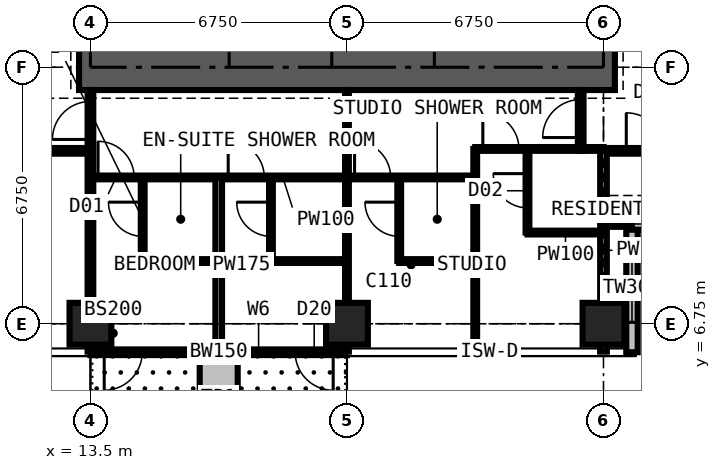
"""IFC4 building model, lengths in metres.
Left out: names, types, materials, properties, quantities, classifications, styles, units other than length and angle.
Written with IfcOpenShell. Run it as: python <this file> out.ifc"""

import sys

from ifc_helpers import new_model, si_unit, direction, frame, frame_2d, origin, origin_2d, place, context, subcontext, project, spatial, rectangle, extrude, element, fill, save


model = new_model("IFC4")
c1 = context("Model", 3, precision=1e-05, world=origin(), true_north=direction((0.0, 1.0)))
c2 = subcontext(c1, "Body", "Model", "MODEL_VIEW")
j1 = project(units=[si_unit("LENGTHUNIT", "METRE"), si_unit("PLANEANGLEUNIT", "RADIAN")], contexts=[c1])
p1 = place(None, origin())
s1 = spatial("IfcSite", under=j1, at=p1, CompositionType="ELEMENT")
p2 = place(p1, origin())
s2 = spatial("IfcBuilding", under=s1, at=p2, CompositionType="ELEMENT")
p3 = place(p2, frame((0.0, 0.0, 225.9)))
s3 = spatial("IfcBuildingStorey", under=s2, at=p3, CompositionType="ELEMENT", Elevation=225.9)
for number, where, z_axis, x_axis in (
    (1, (13.5, 6.75, 0.0), (0.0, 0.0, 1.0), (1.0, 0.0, 0.0)),
    (2, (20.25, 6.75, 0.0), (0.0, 0.0, 1.0), (1.0, 0.0, 0.0)),
    (3, (27.0, 6.75, 0.0), (0.0, 0.0, 1.0), (1.0, 0.0, 0.0)),
):
    element("IfcColumn", number, at=place(p3, frame(where, z_axis=z_axis, x_axis=x_axis)), inside=s3, PredefinedType="COLUMN", context=c2, shape_type="SweptSolid", body=[
        extrude(rectangle(XDim=1.1, YDim=1.1, at=origin_2d()), origin(), (0.0, 0.0, 1.0), 3.6),
    ])
p4 = place(p3, frame((13.2, 13.5, 0.0), z_axis=(0.0, 0.0, 1.0), x_axis=(1.0, 0.0, 0.0)))
e4 = element("IfcWall", 4, at=p4, inside=s3, PredefinedType="SHEAR", context=c2, shape_type="SweptSolid", body=[
    extrude(rectangle(XDim=14.1, YDim=1.2, at=frame_2d((7.05, 0.0))), origin(), (0.0, 0.0, 1.0), 3.6),
])
p5 = place(p3, frame((20.25, 6.0, 0.0), z_axis=(0.0, 0.0, 1.0), x_axis=(-1.0, 0.0, 0.0)))
e5 = element("IfcWall", 5, at=p5, inside=s3, PredefinedType="SOLIDWALL", context=c2, shape_type="SweptSolid", body=[
    extrude(rectangle(XDim=6.75, YDim=0.15, at=frame_2d((3.375, 0.0))), origin(), (0.0, 0.0, 1.0), 3.375),
])
p6 = place(p5, frame((0.363, 0.0, 0.0)))
e6 = element("IfcOpeningElement", 6, at=p6, cuts=e5, PredefinedType="OPENING", context=c2, shape_type="SweptSolid", body=[
    extrude(rectangle(XDim=1.0, YDim=2.2, at=frame_2d((0.5, 1.1))), frame((0.0, 0.085, 0.0), z_axis=(0.0, -1.0, 0.0), x_axis=(1.0, 0.0, 0.0)), (0.0, 0.0, 1.0), 0.17),
])
p7 = place(p5, frame((1.725, 0.0, 0.9)))
e7 = element("IfcOpeningElement", 7, at=p7, cuts=e5, PredefinedType="OPENING", context=c2, shape_type="SweptSolid", body=[
    extrude(rectangle(XDim=1.2, YDim=1.8, at=frame_2d((0.6, 0.9))), frame((0.0, 0.085, 0.0), z_axis=(0.0, -1.0, 0.0), x_axis=(1.0, 0.0, 0.0)), (0.0, 0.0, 1.0), 0.17),
])
p8 = place(p5, frame((5.387, 0.0, 0.0)))
e8 = element("IfcOpeningElement", 8, at=p8, cuts=e5, PredefinedType="OPENING", context=c2, shape_type="SweptSolid", body=[
    extrude(rectangle(XDim=1.0, YDim=2.2, at=frame_2d((0.5, 1.1))), frame((0.0, 0.085, 0.0), z_axis=(0.0, -1.0, 0.0), x_axis=(1.0, 0.0, 0.0)), (0.0, 0.0, 1.0), 0.17),
])
p9 = place(p5, frame((3.825, 0.0, 0.9)))
e9 = element("IfcOpeningElement", 9, at=p9, cuts=e5, PredefinedType="OPENING", context=c2, shape_type="SweptSolid", body=[
    extrude(rectangle(XDim=1.2, YDim=1.8, at=frame_2d((0.6, 0.9))), frame((0.0, 0.085, 0.0), z_axis=(0.0, -1.0, 0.0), x_axis=(1.0, 0.0, 0.0)), (0.0, 0.0, 1.0), 0.17),
])
p10 = place(p3, frame((27.75, 6.0, 0.0), z_axis=(0.0, 0.0, 1.0), x_axis=(0.0, 1.0, 0.0)))
e10 = element("IfcWall", 10, at=p10, inside=s3, PredefinedType="SOLIDWALL", context=c2, shape_type="SweptSolid", body=[
    extrude(rectangle(XDim=3.375, YDim=0.3, at=frame_2d((1.688, 0.0))), origin(), (0.0, 0.0, 1.0), 3.375),
])
p11 = place(p10, frame((0.788, 0.0, 0.6)))
e11 = element("IfcOpeningElement", 11, at=p11, cuts=e10, PredefinedType="OPENING", context=c2, shape_type="SweptSolid", body=[
    extrude(rectangle(XDim=1.8, YDim=2.1, at=frame_2d((0.9, 1.05))), frame((0.0, 0.16, 0.0), z_axis=(0.0, -1.0, 0.0), x_axis=(1.0, 0.0, 0.0)), (0.0, 0.0, 1.0), 0.32),
])
p12 = place(p3, frame((27.75, 9.375, 0.0), z_axis=(0.0, 0.0, 1.0), x_axis=(1.0, 0.0, 0.0)))
e12 = element("IfcWall", 12, at=p12, inside=s3, PredefinedType="SOLIDWALL", context=c2, shape_type="SweptSolid", body=[
    extrude(rectangle(XDim=3.375, YDim=0.3, at=frame_2d((1.688, 0.0))), origin(), (0.0, 0.0, 1.0), 3.375),
])
p13 = place(p12, frame((0.788, 0.0, 0.6)))
e13 = element("IfcOpeningElement", 13, at=p13, cuts=e12, PredefinedType="OPENING", context=c2, shape_type="SweptSolid", body=[
    extrude(rectangle(XDim=1.8, YDim=2.1, at=frame_2d((0.9, 1.05))), frame((0.0, 0.16, 0.0), z_axis=(0.0, -1.0, 0.0), x_axis=(1.0, 0.0, 0.0)), (0.0, 0.0, 1.0), 0.32),
])
p14 = place(p3, frame((16.875, 5.9, 0.0), z_axis=(0.0, 0.0, 1.0), x_axis=(0.0, -1.0, 0.0)))
e14 = element("IfcWall", 14, at=p14, inside=s3, PredefinedType="USERDEFINED", context=c2, shape_type="SweptSolid", body=[
    extrude(rectangle(XDim=2.2, YDim=1.0, at=frame_2d((1.1, 0.0))), origin(), (0.0, 0.0, 1.0), 0.9),
])
p15 = place(p3, frame((10.125, 11.3, 0.0), z_axis=(0.0, 0.0, 1.0), x_axis=(1.0, 0.0, 0.0)))
e15 = element("IfcWall", 15, at=p15, inside=s3, PredefinedType="PARTITIONING", context=c2, shape_type="SweptSolid", body=[
    extrude(rectangle(XDim=3.375, YDim=0.15, at=frame_2d((1.688, 0.0))), origin(), (0.0, 0.0, 1.0), 3.375),
])
p16 = place(p3, frame((13.5, 6.016, 0.0), z_axis=(0.0, 0.0, 1.0), x_axis=(0.0, 1.0, 0.0)))
e16 = element("IfcWall", 16, at=p16, inside=s3, PredefinedType="PARTITIONING", context=c2, shape_type="SweptSolid", body=[
    extrude(rectangle(XDim=6.884, YDim=0.15, at=frame_2d((3.442, 0.0))), origin(), (0.0, 0.0, 1.0), 2.877),
])
p17 = place(p16, frame((5.584, 0.0, 0.0)))
e17 = element("IfcOpeningElement", 17, at=p17, cuts=e16, PredefinedType="OPENING", context=c2, shape_type="SweptSolid", body=[
    extrude(rectangle(XDim=1.0, YDim=2.2, at=frame_2d((0.5, 1.1))), frame((0.0, 0.085, 0.0), z_axis=(0.0, -1.0, 0.0), x_axis=(1.0, 0.0, 0.0)), (0.0, 0.0, 1.0), 0.17),
])
p18 = place(p3, frame((13.5, 10.6, 0.0), z_axis=(0.0, 0.0, 1.0), x_axis=(1.0, 0.0, 0.0)))
e18 = element("IfcWall", 18, at=p18, inside=s3, PredefinedType="PARTITIONING", context=c2, shape_type="SweptSolid", body=[
    extrude(rectangle(XDim=10.125, YDim=0.1, at=frame_2d((5.062, 0.0))), origin(), (0.0, 0.0, 1.0), 3.375),
])
p19 = place(p18, frame((0.2, 0.0, 0.0)))
e19 = element("IfcOpeningElement", 19, at=p19, cuts=e18, PredefinedType="OPENING", context=c2, shape_type="SweptSolid", body=[
    extrude(rectangle(XDim=0.95, YDim=2.2, at=frame_2d((0.475, 1.1))), frame((0.0, 0.06, 0.0), z_axis=(0.0, -1.0, 0.0), x_axis=(1.0, 0.0, 0.0)), (0.0, 0.0, 1.0), 0.12),
])
p20 = place(p18, frame((3.625, 0.0, 0.0)))
e20 = element("IfcOpeningElement", 20, at=p20, cuts=e18, PredefinedType="OPENING", context=c2, shape_type="SweptSolid", body=[
    extrude(rectangle(XDim=0.95, YDim=2.2, at=frame_2d((0.475, 1.1))), frame((0.0, 0.06, 0.0), z_axis=(0.0, -1.0, 0.0), x_axis=(1.0, 0.0, 0.0)), (0.0, 0.0, 1.0), 0.12),
])
p21 = place(p18, frame((6.95, 0.0, 0.0)))
e21 = element("IfcOpeningElement", 21, at=p21, cuts=e18, PredefinedType="OPENING", context=c2, shape_type="SweptSolid", body=[
    extrude(rectangle(XDim=0.95, YDim=2.2, at=frame_2d((0.475, 1.1))), frame((0.0, 0.06, 0.0), z_axis=(0.0, -1.0, 0.0), x_axis=(1.0, 0.0, 0.0)), (0.0, 0.0, 1.0), 0.12),
])
p22 = place(p3, frame((14.875, 8.4, 0.0), z_axis=(0.0, 0.0, 1.0), x_axis=(0.0, 1.0, 0.0)))
e22 = element("IfcWall", 22, at=p22, inside=s3, PredefinedType="PARTITIONING", context=c2, shape_type="SweptSolid", body=[
    extrude(rectangle(XDim=2.2, YDim=0.1, at=frame_2d((1.1, 0.0))), origin(), (0.0, 0.0, 1.0), 3.375),
])
p23 = place(p22, frame((0.65, 0.0, 0.0)))
e23 = element("IfcOpeningElement", 23, at=p23, cuts=e22, PredefinedType="OPENING", context=c2, shape_type="SweptSolid", body=[
    extrude(rectangle(XDim=0.9, YDim=2.2, at=frame_2d((0.45, 1.1))), frame((0.0, 0.06, 0.0), z_axis=(0.0, -1.0, 0.0), x_axis=(1.0, 0.0, 0.0)), (0.0, 0.0, 1.0), 0.12),
])
p24 = place(p3, frame((14.875, 8.4, 0.0), z_axis=(0.0, 0.0, 1.0), x_axis=(1.0, 0.0, 0.0)))
e24 = element("IfcWall", 24, at=p24, inside=s3, PredefinedType="PARTITIONING", context=c2, shape_type="SweptSolid", body=[
    extrude(rectangle(XDim=2.0, YDim=0.1, at=frame_2d((1.0, 0.0))), origin(), (0.0, 0.0, 1.0), 3.375),
])
p25 = place(p3, frame((16.875, 6.016, 0.0), z_axis=(0.0, 0.0, 1.0), x_axis=(0.0, 1.0, 0.0)))
e25 = element("IfcWall", 25, at=p25, inside=s3, PredefinedType="PARTITIONING", context=c2, shape_type="SweptSolid", body=[
    extrude(rectangle(XDim=4.584, YDim=0.175, at=frame_2d((2.292, 0.0))), origin(), (0.0, 0.0, 1.0), 3.375),
])
p26 = place(p3, frame((18.25, 8.4, 0.0), z_axis=(0.0, 0.0, 1.0), x_axis=(0.0, 1.0, 0.0)))
e26 = element("IfcWall", 26, at=p26, inside=s3, PredefinedType="PARTITIONING", context=c2, shape_type="SweptSolid", body=[
    extrude(rectangle(XDim=2.2, YDim=0.1, at=frame_2d((1.1, 0.0))), origin(), (0.0, 0.0, 1.0), 3.375),
])
p27 = place(p26, frame((0.65, 0.0, 0.0)))
e27 = element("IfcOpeningElement", 27, at=p27, cuts=e26, PredefinedType="OPENING", context=c2, shape_type="SweptSolid", body=[
    extrude(rectangle(XDim=0.9, YDim=2.2, at=frame_2d((0.45, 1.1))), frame((0.0, 0.06, 0.0), z_axis=(0.0, -1.0, 0.0), x_axis=(1.0, 0.0, 0.0)), (0.0, 0.0, 1.0), 0.12),
])
p28 = place(p3, frame((18.25, 8.4, 0.0), z_axis=(0.0, 0.0, 1.0), x_axis=(1.0, 0.0, 0.0)))
e28 = element("IfcWall", 28, at=p28, inside=s3, PredefinedType="PARTITIONING", context=c2, shape_type="SweptSolid", body=[
    extrude(rectangle(XDim=2.0, YDim=0.1, at=frame_2d((1.0, 0.0))), origin(), (0.0, 0.0, 1.0), 3.375),
])
p29 = place(p3, frame((20.25, 6.016, 0.0), z_axis=(0.0, 0.0, 1.0), x_axis=(0.0, 1.0, 0.0)))
e29 = element("IfcWall", 29, at=p29, inside=s3, PredefinedType="PARTITIONING", context=c2, shape_type="SweptSolid", body=[
    extrude(rectangle(XDim=6.884, YDim=0.1, at=frame_2d((3.442, 0.0))), origin(), (0.0, 0.0, 1.0), 2.877),
])
p30 = place(p3, frame((21.625, 8.4, 0.0), z_axis=(0.0, 0.0, 1.0), x_axis=(0.0, 1.0, 0.0)))
e30 = element("IfcWall", 30, at=p30, inside=s3, PredefinedType="PARTITIONING", context=c2, shape_type="SweptSolid", body=[
    extrude(rectangle(XDim=2.2, YDim=0.1, at=frame_2d((1.1, 0.0))), origin(), (0.0, 0.0, 1.0), 3.375),
])
p31 = place(p30, frame((0.65, 0.0, 0.0)))
e31 = element("IfcOpeningElement", 31, at=p31, cuts=e30, PredefinedType="OPENING", context=c2, shape_type="SweptSolid", body=[
    extrude(rectangle(XDim=0.9, YDim=2.2, at=frame_2d((0.45, 1.1))), frame((0.0, 0.06, 0.0), z_axis=(0.0, -1.0, 0.0), x_axis=(1.0, 0.0, 0.0)), (0.0, 0.0, 1.0), 0.12),
])
p32 = place(p3, frame((21.625, 8.4, 0.0), z_axis=(0.0, 0.0, 1.0), x_axis=(1.0, 0.0, 0.0)))
e32 = element("IfcWall", 32, at=p32, inside=s3, PredefinedType="PARTITIONING", context=c2, shape_type="SweptSolid", body=[
    extrude(rectangle(XDim=2.0, YDim=0.1, at=frame_2d((1.0, 0.0))), origin(), (0.0, 0.0, 1.0), 3.375),
])
p33 = place(p3, frame((23.625, 6.016, 0.0), z_axis=(0.0, 0.0, 1.0), x_axis=(0.0, 1.0, 0.0)))
e33 = element("IfcWall", 33, at=p33, inside=s3, PredefinedType="PARTITIONING", context=c2, shape_type="SweptSolid", body=[
    extrude(rectangle(XDim=5.334, YDim=0.1, at=frame_2d((2.667, 0.0))), origin(), (0.0, 0.0, 1.0), 3.375),
])
p34 = place(p3, frame((23.625, 11.35, 0.0), z_axis=(0.0, 0.0, 1.0), x_axis=(1.0, 0.0, 0.0)))
e34 = element("IfcWall", 34, at=p34, inside=s3, PredefinedType="PARTITIONING", context=c2, shape_type="SweptSolid", body=[
    extrude(rectangle(XDim=3.375, YDim=0.1, at=frame_2d((1.688, 0.0))), origin(), (0.0, 0.0, 1.0), 3.375),
])
p35 = place(p34, frame((0.2, 0.0, 0.0)))
e35 = element("IfcOpeningElement", 35, at=p35, cuts=e34, PredefinedType="OPENING", context=c2, shape_type="SweptSolid", body=[
    extrude(rectangle(XDim=0.95, YDim=2.2, at=frame_2d((0.475, 1.1))), frame((0.0, 0.06, 0.0), z_axis=(0.0, -1.0, 0.0), x_axis=(1.0, 0.0, 0.0)), (0.0, 0.0, 1.0), 0.12),
])
p36 = place(p3, frame((25.0, 9.15, 0.0), z_axis=(0.0, 0.0, 1.0), x_axis=(0.0, 1.0, 0.0)))
e36 = element("IfcWall", 36, at=p36, inside=s3, PredefinedType="PARTITIONING", context=c2, shape_type="SweptSolid", body=[
    extrude(rectangle(XDim=2.2, YDim=0.1, at=frame_2d((1.1, 0.0))), origin(), (0.0, 0.0, 1.0), 3.375),
])
p37 = place(p36, frame((0.65, 0.0, 0.0)))
e37 = element("IfcOpeningElement", 37, at=p37, cuts=e36, PredefinedType="OPENING", context=c2, shape_type="SweptSolid", body=[
    extrude(rectangle(XDim=0.9, YDim=2.2, at=frame_2d((0.45, 1.1))), frame((0.0, 0.06, 0.0), z_axis=(0.0, -1.0, 0.0), x_axis=(1.0, 0.0, 0.0)), (0.0, 0.0, 1.0), 0.12),
])
p38 = place(p3, frame((25.0, 9.15, 0.0), z_axis=(0.0, 0.0, 1.0), x_axis=(1.0, 0.0, 0.0)))
e38 = element("IfcWall", 38, at=p38, inside=s3, PredefinedType="PARTITIONING", context=c2, shape_type="SweptSolid", body=[
    extrude(rectangle(XDim=2.0, YDim=0.1, at=frame_2d((1.0, 0.0))), origin(), (0.0, 0.0, 1.0), 3.375),
])
p39 = place(p3, frame((26.4, 11.3, 0.0), z_axis=(0.0, 0.0, 1.0), x_axis=(0.0, 1.0, 0.0)))
e39 = element("IfcWall", 39, at=p39, inside=s3, PredefinedType="PARTITIONING", context=c2, shape_type="SweptSolid", body=[
    extrude(rectangle(XDim=1.6, YDim=0.15, at=frame_2d((0.8, 0.0))), origin(), (0.0, 0.0, 1.0), 3.375),
])
p40 = place(p39, frame((0.35, 0.0, 0.0)))
e40 = element("IfcOpeningElement", 40, at=p40, cuts=e39, PredefinedType="OPENING", context=c2, shape_type="SweptSolid", body=[
    extrude(rectangle(XDim=1.0, YDim=2.2, at=frame_2d((0.5, 1.1))), frame((0.0, 0.085, 0.0), z_axis=(0.0, -1.0, 0.0), x_axis=(1.0, 0.0, 0.0)), (0.0, 0.0, 1.0), 0.17),
])
p41 = place(p3, frame((27.0, 11.3, 0.0), z_axis=(0.0, 0.0, 1.0), x_axis=(1.0, 0.0, 0.0)))
e41 = element("IfcWall", 41, at=p41, inside=s3, PredefinedType="PARTITIONING", context=c2, shape_type="SweptSolid", body=[
    extrude(rectangle(XDim=3.375, YDim=0.15, at=frame_2d((1.688, 0.0))), origin(), (0.0, 0.0, 1.0), 3.375),
])
p42 = place(p41, frame((0.6, 0.0, 0.0)))
e42 = element("IfcOpeningElement", 42, at=p42, cuts=e41, PredefinedType="OPENING", context=c2, shape_type="SweptSolid", body=[
    extrude(rectangle(XDim=1.0, YDim=2.2, at=frame_2d((0.5, 1.1))), frame((0.0, 0.085, 0.0), z_axis=(0.0, -1.0, 0.0), x_axis=(1.0, 0.0, 0.0)), (0.0, 0.0, 1.0), 0.17),
])
p43 = place(p3, frame((27.0, 6.016, 0.0), z_axis=(0.0, 0.0, 1.0), x_axis=(0.0, 1.0, 0.0)))
e43 = element("IfcWall", 43, at=p43, inside=s3, PredefinedType="PARTITIONING", context=c2, shape_type="SweptSolid", body=[
    extrude(rectangle(XDim=5.334, YDim=0.175, at=frame_2d((2.667, 0.0))), origin(), (0.0, 0.0, 1.0), 2.877),
])
p44 = place(p3, frame((27.0, 9.375, 0.0), z_axis=(0.0, 0.0, 1.0), x_axis=(1.0, 0.0, 0.0)))
e44 = element("IfcWall", 44, at=p44, inside=s3, PredefinedType="PARTITIONING", context=c2, shape_type="SweptSolid", body=[
    extrude(rectangle(XDim=0.734, YDim=0.15, at=frame_2d((0.367, 0.0))), origin(), (0.0, 0.0, 1.0), 3.375),
])
p45 = place(p6, origin())
e45 = element("IfcDoor", 45, at=p45, inside=s3, OperationType="SINGLE_SWING_LEFT", PredefinedType="DOOR", context=c2, shape_type="SweptSolid", body=[
    extrude(rectangle(XDim=1.0, YDim=2.2, at=frame_2d((0.5, 1.1))), frame((0.0, 0.025, 0.0), z_axis=(0.0, -1.0, 0.0), x_axis=(1.0, 0.0, 0.0)), (0.0, 0.0, 1.0), 0.05),
])
fill(e6, e45)
p46 = place(p7, origin())
e46 = element("IfcWindow", 46, at=p46, inside=s3, PartitioningType="SINGLE_PANEL", PredefinedType="WINDOW", context=c2, shape_type="SweptSolid", body=[
    extrude(rectangle(XDim=1.2, YDim=1.8, at=frame_2d((0.6, 0.9))), frame((0.0, 0.03, 0.0), z_axis=(0.0, -1.0, 0.0), x_axis=(1.0, 0.0, 0.0)), (0.0, 0.0, 1.0), 0.06),
])
fill(e7, e46)
p47 = place(p8, origin())
e47 = element("IfcDoor", 47, at=p47, inside=s3, OperationType="SINGLE_SWING_RIGHT", PredefinedType="DOOR", context=c2, shape_type="SweptSolid", body=[
    extrude(rectangle(XDim=1.0, YDim=2.2, at=frame_2d((0.5, 1.1))), frame((0.0, 0.025, 0.0), z_axis=(0.0, -1.0, 0.0), x_axis=(1.0, 0.0, 0.0)), (0.0, 0.0, 1.0), 0.05),
])
fill(e8, e47)
p48 = place(p9, origin())
e48 = element("IfcWindow", 48, at=p48, inside=s3, PartitioningType="SINGLE_PANEL", PredefinedType="WINDOW", context=c2, shape_type="SweptSolid", body=[
    extrude(rectangle(XDim=1.2, YDim=1.8, at=frame_2d((0.6, 0.9))), frame((0.0, 0.03, 0.0), z_axis=(0.0, -1.0, 0.0), x_axis=(1.0, 0.0, 0.0)), (0.0, 0.0, 1.0), 0.06),
])
fill(e9, e48)
p49 = place(p11, origin())
e49 = element("IfcWindow", 49, at=p49, inside=s3, PartitioningType="SINGLE_PANEL", PredefinedType="WINDOW", context=c2, shape_type="SweptSolid", body=[
    extrude(rectangle(XDim=1.8, YDim=2.1, at=frame_2d((0.9, 1.05))), frame((0.0, 0.03, 0.0), z_axis=(0.0, -1.0, 0.0), x_axis=(1.0, 0.0, 0.0)), (0.0, 0.0, 1.0), 0.06),
])
fill(e11, e49)
p50 = place(p19, origin())
e50 = element("IfcDoor", 50, at=p50, inside=s3, OperationType="SINGLE_SWING_LEFT", PredefinedType="DOOR", context=c2, shape_type="SweptSolid", body=[
    extrude(rectangle(XDim=0.95, YDim=2.2, at=frame_2d((0.475, 1.1))), frame((0.0, 0.025, 0.0), z_axis=(0.0, -1.0, 0.0), x_axis=(1.0, 0.0, 0.0)), (0.0, 0.0, 1.0), 0.05),
])
fill(e19, e50)
p51 = place(p23, origin())
e51 = element("IfcDoor", 51, at=p51, inside=s3, OperationType="SINGLE_SWING_RIGHT", PredefinedType="DOOR", context=c2, shape_type="SweptSolid", body=[
    extrude(rectangle(XDim=0.9, YDim=2.2, at=frame_2d((0.45, 1.1))), frame((0.0, 0.025, 0.0), z_axis=(0.0, -1.0, 0.0), x_axis=(1.0, 0.0, 0.0)), (0.0, 0.0, 1.0), 0.05),
])
fill(e23, e51)
p52 = place(p20, origin())
e52 = element("IfcDoor", 52, at=p52, inside=s3, OperationType="SINGLE_SWING_LEFT", PredefinedType="DOOR", context=c2, shape_type="SweptSolid", body=[
    extrude(rectangle(XDim=0.95, YDim=2.2, at=frame_2d((0.475, 1.1))), frame((0.0, 0.025, 0.0), z_axis=(0.0, -1.0, 0.0), x_axis=(1.0, 0.0, 0.0)), (0.0, 0.0, 1.0), 0.05),
])
fill(e20, e52)
p53 = place(p27, origin())
e53 = element("IfcDoor", 53, at=p53, inside=s3, OperationType="SINGLE_SWING_RIGHT", PredefinedType="DOOR", context=c2, shape_type="SweptSolid", body=[
    extrude(rectangle(XDim=0.9, YDim=2.2, at=frame_2d((0.45, 1.1))), frame((0.0, 0.025, 0.0), z_axis=(0.0, -1.0, 0.0), x_axis=(1.0, 0.0, 0.0)), (0.0, 0.0, 1.0), 0.05),
])
fill(e27, e53)
p54 = place(p17, origin())
e54 = element("IfcDoor", 54, at=p54, inside=s3, OperationType="SINGLE_SWING_LEFT", PredefinedType="DOOR", context=c2, shape_type="SweptSolid", body=[
    extrude(rectangle(XDim=1.0, YDim=2.2, at=frame_2d((0.5, 1.1))), frame((0.0, 0.025, 0.0), z_axis=(0.0, -1.0, 0.0), x_axis=(1.0, 0.0, 0.0)), (0.0, 0.0, 1.0), 0.05),
])
fill(e17, e54)
p55 = place(p21, origin())
e55 = element("IfcDoor", 55, at=p55, inside=s3, OperationType="SINGLE_SWING_LEFT", PredefinedType="DOOR", context=c2, shape_type="SweptSolid", body=[
    extrude(rectangle(XDim=0.95, YDim=2.2, at=frame_2d((0.475, 1.1))), frame((0.0, 0.025, 0.0), z_axis=(0.0, -1.0, 0.0), x_axis=(1.0, 0.0, 0.0)), (0.0, 0.0, 1.0), 0.05),
])
fill(e21, e55)
p56 = place(p31, origin())
e56 = element("IfcDoor", 56, at=p56, inside=s3, OperationType="SINGLE_SWING_RIGHT", PredefinedType="DOOR", context=c2, shape_type="SweptSolid", body=[
    extrude(rectangle(XDim=0.9, YDim=2.2, at=frame_2d((0.45, 1.1))), frame((0.0, 0.025, 0.0), z_axis=(0.0, -1.0, 0.0), x_axis=(1.0, 0.0, 0.0)), (0.0, 0.0, 1.0), 0.05),
])
fill(e31, e56)
p57 = place(p35, origin())
e57 = element("IfcDoor", 57, at=p57, inside=s3, OperationType="SINGLE_SWING_LEFT", PredefinedType="DOOR", context=c2, shape_type="SweptSolid", body=[
    extrude(rectangle(XDim=0.95, YDim=2.2, at=frame_2d((0.475, 1.1))), frame((0.0, 0.025, 0.0), z_axis=(0.0, -1.0, 0.0), x_axis=(1.0, 0.0, 0.0)), (0.0, 0.0, 1.0), 0.05),
])
fill(e35, e57)
p58 = place(p37, origin())
e58 = element("IfcDoor", 58, at=p58, inside=s3, OperationType="SINGLE_SWING_RIGHT", PredefinedType="DOOR", context=c2, shape_type="SweptSolid", body=[
    extrude(rectangle(XDim=0.9, YDim=2.2, at=frame_2d((0.45, 1.1))), frame((0.0, 0.025, 0.0), z_axis=(0.0, -1.0, 0.0), x_axis=(1.0, 0.0, 0.0)), (0.0, 0.0, 1.0), 0.05),
])
fill(e37, e58)
p59 = place(p42, origin())
e59 = element("IfcDoor", 59, at=p59, inside=s3, OperationType="SINGLE_SWING_LEFT", PredefinedType="DOOR", context=c2, shape_type="SweptSolid", body=[
    extrude(rectangle(XDim=1.0, YDim=2.2, at=frame_2d((0.5, 1.1))), frame((0.0, 0.025, 0.0), z_axis=(0.0, -1.0, 0.0), x_axis=(1.0, 0.0, 0.0)), (0.0, 0.0, 1.0), 0.05),
])
fill(e42, e59)
p60 = place(p40, origin())
e60 = element("IfcDoor", 60, at=p60, inside=s3, OperationType="SINGLE_SWING_LEFT", PredefinedType="DOOR", context=c2, shape_type="SweptSolid", body=[
    extrude(rectangle(XDim=1.0, YDim=2.2, at=frame_2d((0.5, 1.1))), frame((0.0, 0.025, 0.0), z_axis=(0.0, -1.0, 0.0), x_axis=(1.0, 0.0, 0.0)), (0.0, 0.0, 1.0), 0.05),
])
fill(e40, e60)
save(model, sys.argv[1])
